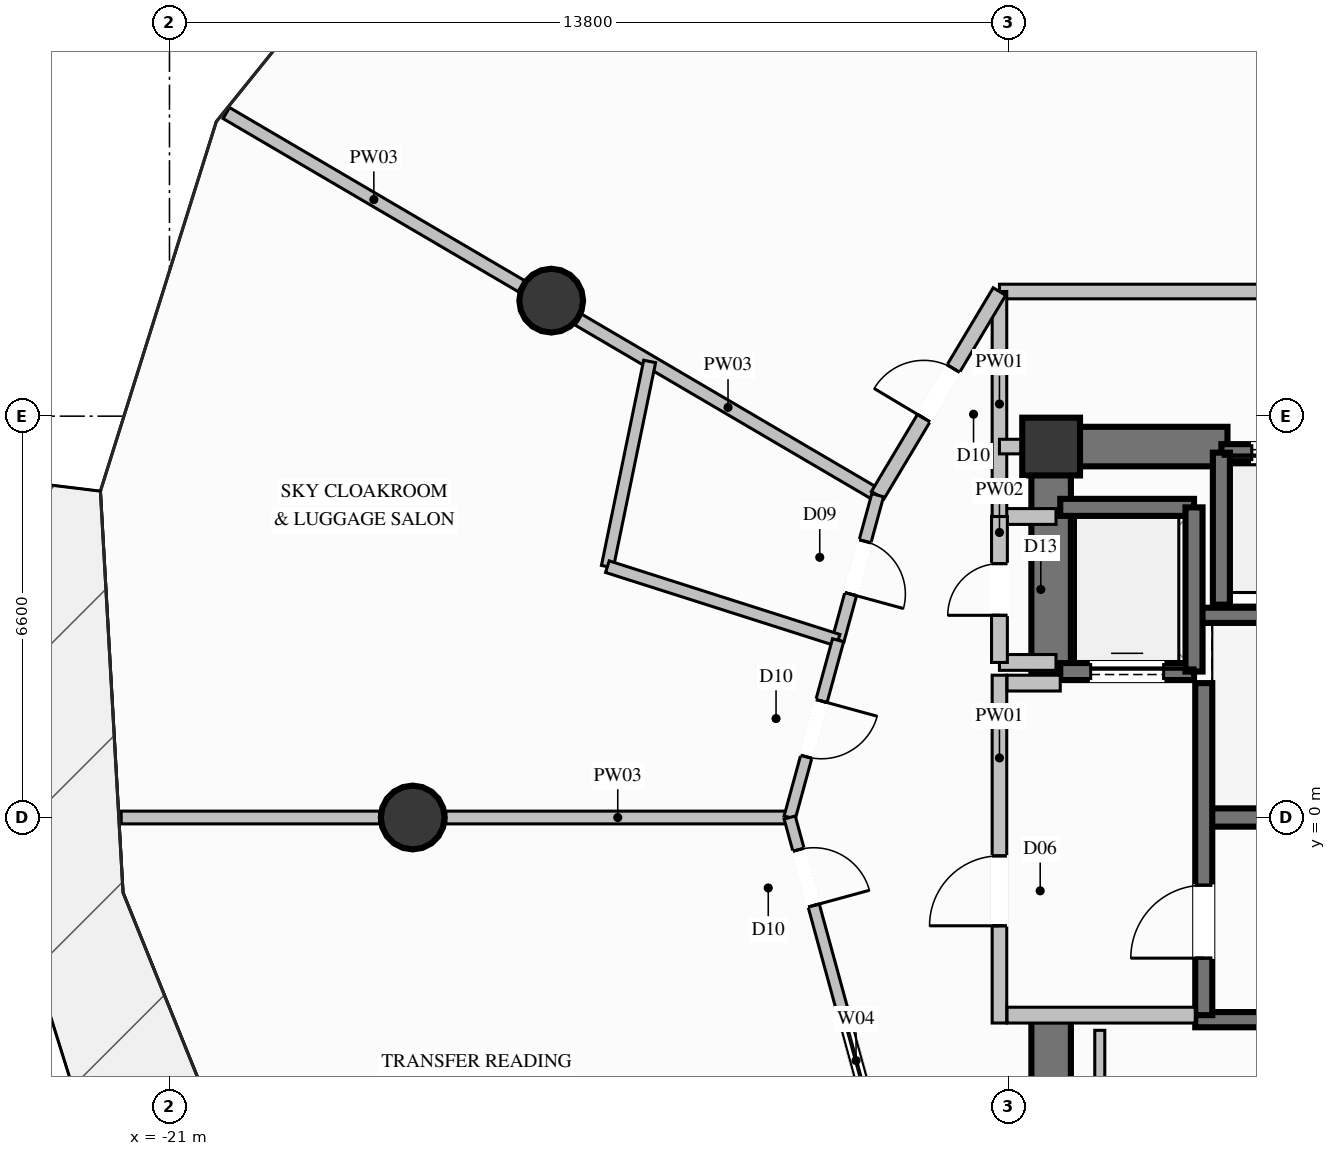
"""IFC4 building model, lengths in metres.
Left out: names, types, materials, properties, quantities, classifications, styles, units other than length and angle.
Written with IfcOpenShell. Run it as: python <this file> out.ifc"""

import sys

from ifc_helpers import new_model, si_unit, direction, frame, frame_2d, origin, origin_2d, place, context, subcontext, project, spatial, rectangle, circle, extrude, element, fill, save


model = new_model("IFC4")
c1 = context("Model", 3, precision=1e-05, world=origin(), true_north=direction((0.0, 1.0)))
c2 = subcontext(c1, "Body", "Model", "MODEL_VIEW")
j1 = project(units=[si_unit("LENGTHUNIT", "METRE"), si_unit("PLANEANGLEUNIT", "RADIAN")], contexts=[c1])
p1 = place(None, origin())
s1 = spatial("IfcSite", under=j1, at=p1, CompositionType="ELEMENT")
p2 = place(p1, origin())
s2 = spatial("IfcBuilding", under=s1, at=p2, CompositionType="ELEMENT")
p3 = place(p2, frame((0.0, 0.0, 98.0)))
s3 = spatial("IfcBuildingStorey", under=s2, at=p3, CompositionType="ELEMENT", Elevation=98.0)
p4 = place(p3, frame((-6.5, 6.1, 0.0), z_axis=(0.0, 0.0, 1.0), x_axis=(1.0, 0.0, 0.0)))
e1 = element("IfcColumn", 1, at=p4, inside=s3, PredefinedType="COLUMN", context=c2, shape_type="SweptSolid", body=[
    extrude(rectangle(XDim=0.95, YDim=0.95, at=origin_2d()), origin(), (0.0, 0.0, 1.0), 4.6),
])
p5 = place(p3, frame((-3.99, 0.0, 0.0), z_axis=(0.0, 0.0, 1.0), x_axis=(1.0, 0.0, 0.0)))
e2 = element("IfcWall", 2, at=p5, inside=s3, PredefinedType="SHEAR", context=c2, shape_type="SweptSolid", body=[
    extrude(rectangle(XDim=7.98, YDim=0.3, at=frame_2d((3.99, 0.0))), origin(), (0.0, 0.0, 1.0), 4.6),
])
for number, where, z_axis, x_axis in (
    (3, (-4.13, -3.325, 0.0), (0.0, 0.0, 1.0), (1.0, 0.0, 0.0)),
    (4, (-4.13, 3.325, 0.0), (0.0, 0.0, 1.0), (1.0, 0.0, 0.0)),
):
    element("IfcWall", number, at=place(p3, frame(where, z_axis=z_axis, x_axis=x_axis)), inside=s3, PredefinedType="SOLIDWALL", context=c2, shape_type="SweptSolid", body=[
        extrude(rectangle(XDim=8.26, YDim=0.25, at=frame_2d((4.13, 0.0))), origin(), (0.0, 0.0, 1.0), 4.6),
    ])
p6 = place(p3, frame((-6.175, 6.1, 0.0), z_axis=(0.0, 0.0, 1.0), x_axis=(1.0, 0.0, 0.0)))
e5 = element("IfcWall", 5, at=p6, inside=s3, PredefinedType="SHEAR", context=c2, shape_type="SweptSolid", body=[
    extrude(rectangle(XDim=2.575, YDim=0.65, at=frame_2d((1.288, 0.0))), origin(), (0.0, 0.0, 1.0), 4.6),
])
p7 = place(p3, frame((-6.5, 2.35, 0.0), z_axis=(0.0, 0.0, 1.0), x_axis=(0.0, 1.0, 0.0)))
e6 = element("IfcWall", 6, at=p7, inside=s3, PredefinedType="SHEAR", context=c2, shape_type="SweptSolid", body=[
    extrude(rectangle(XDim=4.075, YDim=0.65, at=frame_2d((2.038, 0.0))), origin(), (0.0, 0.0, 1.0), 4.6),
])
p8 = place(p3, frame((-6.5, -6.425, 0.0), z_axis=(0.0, 0.0, 1.0), x_axis=(0.0, 1.0, 0.0)))
e7 = element("IfcWall", 7, at=p8, inside=s3, PredefinedType="SHEAR", context=c2, shape_type="SweptSolid", body=[
    extrude(rectangle(XDim=3.075, YDim=0.65, at=frame_2d((1.538, 0.0))), origin(), (0.0, 0.0, 1.0), 4.6),
])
for number, where, z_axis, x_axis in (
    (8, (-14.722, 8.5, 0.0), (0.0, 0.0, 1.0), (1.0, 0.0, 0.0)),
    (9, (-17.0, 0.0, 0.0), (0.0, 0.0, 1.0), (1.0, 0.0, 0.0)),
):
    element("IfcColumn", number, at=place(p3, frame(where, z_axis=z_axis, x_axis=x_axis)), inside=s3, PredefinedType="COLUMN", context=c2, shape_type="SweptSolid", body=[
        extrude(circle(Radius=0.525, at=origin_2d()), origin(), (0.0, 0.0, 1.0), 4.6),
    ])
p9 = place(p3, frame((-1.6, 6.0, 0.0), z_axis=(0.0, 0.0, 1.0), x_axis=(-1.0, 0.0, 0.0)))
e10 = element("IfcWall", 10, at=p9, inside=s3, PredefinedType="SOLIDWALL", context=c2, shape_type="SweptSolid", body=[
    extrude(rectangle(XDim=2.1, YDim=0.28, at=frame_2d((1.05, 0.0))), origin(), (0.0, 0.0, 1.0), 4.35),
])
p10 = place(p9, frame((0.5, 0.0, 0.0)))
e11 = element("IfcOpeningElement", 11, at=p10, cuts=e10, PredefinedType="OPENING", context=c2, shape_type="SweptSolid", body=[
    extrude(rectangle(XDim=1.1, YDim=2.2, at=frame_2d((0.55, 1.1))), frame((0.0, 0.15, 0.0), z_axis=(0.0, -1.0, 0.0), x_axis=(1.0, 0.0, 0.0)), (0.0, 0.0, 1.0), 0.3),
])
p11 = place(p3, frame((-3.7, 6.0, 0.0), z_axis=(0.0, 0.0, 1.0), x_axis=(0.0, -1.0, 0.0)))
e12 = element("IfcWall", 12, at=p11, inside=s3, PredefinedType="SOLIDWALL", context=c2, shape_type="SweptSolid", body=[
    extrude(rectangle(XDim=2.5, YDim=0.28, at=frame_2d((1.25, 0.0))), origin(), (0.0, 0.0, 1.0), 4.35),
])
p12 = place(p3, frame((-6.35, 2.4, 0.0), z_axis=(0.0, 0.0, 1.0), x_axis=(1.0, 0.0, 0.0)))
e13 = element("IfcWall", 13, at=p12, inside=s3, PredefinedType="SOLIDWALL", context=c2, shape_type="SweptSolid", body=[
    extrude(rectangle(XDim=2.2, YDim=0.28, at=frame_2d((1.1, 0.0))), origin(), (0.0, 0.0, 1.0), 4.35),
])
p13 = place(p12, frame((0.5, 0.0, 0.0)))
e14 = element("IfcOpeningElement", 14, at=p13, cuts=e13, PredefinedType="OPENING", context=c2, shape_type="SweptSolid", body=[
    extrude(rectangle(XDim=1.2, YDim=2.2, at=frame_2d((0.6, 1.1))), frame((0.0, 0.15, 0.0), z_axis=(0.0, -1.0, 0.0), x_axis=(1.0, 0.0, 0.0)), (0.0, 0.0, 1.0), 0.3),
])
p14 = place(p3, frame((-4.15, 5.1, 0.0), z_axis=(0.0, 0.0, 1.0), x_axis=(-1.0, 0.0, 0.0)))
e15 = element("IfcWall", 15, at=p14, inside=s3, PredefinedType="SOLIDWALL", context=c2, shape_type="SweptSolid", body=[
    extrude(rectangle(XDim=2.2, YDim=0.28, at=frame_2d((1.1, 0.0))), origin(), (0.0, 0.0, 1.0), 4.35),
])
p15 = place(p3, frame((-4.15, 2.4, 0.0), z_axis=(0.0, 0.0, 1.0), x_axis=(0.0, 1.0, 0.0)))
e16 = element("IfcWall", 16, at=p15, inside=s3, PredefinedType="SOLIDWALL", context=c2, shape_type="SweptSolid", body=[
    extrude(rectangle(XDim=2.7, YDim=0.28, at=frame_2d((1.35, 0.0))), origin(), (0.0, 0.0, 1.0), 4.35),
])
p16 = place(p3, frame((-3.99, -3.25, 0.0), z_axis=(0.0, 0.0, 1.0), x_axis=(0.0, 1.0, 0.0)))
e17 = element("IfcWall", 17, at=p16, inside=s3, PredefinedType="SOLIDWALL", context=c2, shape_type="SweptSolid", body=[
    extrude(rectangle(XDim=5.46, YDim=0.28, at=frame_2d((2.73, 0.0))), origin(), (0.0, 0.0, 1.0), 4.35),
])
p17 = place(p16, frame((0.937, 0.0, 0.0)))
e18 = element("IfcOpeningElement", 18, at=p17, cuts=e17, PredefinedType="OPENING", context=c2, shape_type="SweptSolid", body=[
    extrude(rectangle(XDim=1.2, YDim=2.2, at=frame_2d((0.6, 1.1))), frame((0.0, 0.15, 0.0), z_axis=(0.0, -1.0, 0.0), x_axis=(1.0, 0.0, 0.0)), (0.0, 0.0, 1.0), 0.3),
])
p18 = place(p3, frame((-7.35, -3.38, 0.0), z_axis=(0.0, 0.0, 1.0), x_axis=(0.0, 1.0, 0.0)))
e19 = element("IfcWall", 19, at=p18, inside=s3, PredefinedType="PARTITIONING", context=c2, shape_type="SweptSolid", body=[
    extrude(rectangle(XDim=5.72, YDim=0.24, at=frame_2d((2.86, 0.0))), origin(), (0.0, 0.0, 1.0), 3.235),
])
p19 = place(p18, frame((1.599, 0.0, 0.0)))
e20 = element("IfcOpeningElement", 20, at=p19, cuts=e19, PredefinedType="OPENING", context=c2, shape_type="SweptSolid", body=[
    extrude(rectangle(XDim=1.15, YDim=2.2, at=frame_2d((0.575, 1.1))), frame((0.0, 0.13, 0.0), z_axis=(0.0, -1.0, 0.0), x_axis=(1.0, 0.0, 0.0)), (0.0, 0.0, 1.0), 0.26),
])
p20 = place(p3, frame((-7.225, -3.25, 0.0), z_axis=(0.0, 0.0, 1.0), x_axis=(1.0, 0.0, 0.0)))
e21 = element("IfcWall", 21, at=p20, inside=s3, PredefinedType="PARTITIONING", context=c2, shape_type="SweptSolid", body=[
    extrude(rectangle(XDim=3.095, YDim=0.26, at=frame_2d((1.548, 0.0))), origin(), (0.0, 0.0, 1.0), 4.35),
])
p21 = place(p3, frame((-7.225, 2.21, 0.0), z_axis=(0.0, 0.0, 1.0), x_axis=(1.0, 0.0, 0.0)))
e22 = element("IfcWall", 22, at=p21, inside=s3, PredefinedType="PARTITIONING", context=c2, shape_type="SweptSolid", body=[
    extrude(rectangle(XDim=0.875, YDim=0.26, at=frame_2d((0.438, 0.0))), origin(), (0.0, 0.0, 1.0), 4.35),
])
for number, where, z_axis, x_axis in (
    (23, (-7.35, 4.95, 0.0), (0.0, 0.0, 1.0), (1.0, 0.0, 0.0)),
    (24, (-7.35, 2.55, 0.0), (0.0, 0.0, 1.0), (1.0, 0.0, 0.0)),
):
    element("IfcWall", number, at=place(p3, frame(where, z_axis=z_axis, x_axis=x_axis)), inside=s3, PredefinedType="PARTITIONING", context=c2, shape_type="SweptSolid", body=[
        extrude(rectangle(XDim=0.93, YDim=0.26, at=frame_2d((0.465, 0.0))), origin(), (0.0, 0.0, 1.0), 4.35),
    ])
p22 = place(p3, frame((-7.35, 2.55, 0.0), z_axis=(0.0, 0.0, 1.0), x_axis=(0.0, 1.0, 0.0)))
e25 = element("IfcWall", 25, at=p22, inside=s3, PredefinedType="PARTITIONING", context=c2, shape_type="SweptSolid", body=[
    extrude(rectangle(XDim=2.4, YDim=0.26, at=frame_2d((1.2, 0.0))), origin(), (0.0, 0.0, 1.0), 3.235),
])
p23 = place(p22, frame((0.775, 0.0, 0.0)))
e26 = element("IfcOpeningElement", 26, at=p23, cuts=e25, PredefinedType="OPENING", context=c2, shape_type="SweptSolid", body=[
    extrude(rectangle(XDim=0.85, YDim=2.05, at=frame_2d((0.425, 1.025))), frame((0.0, 0.14, 0.0), z_axis=(0.0, -1.0, 0.0), x_axis=(1.0, 0.0, 0.0)), (0.0, 0.0, 1.0), 0.28),
])
p24 = place(p3, frame((-7.35, 8.65, 0.0), z_axis=(0.0, 0.0, 1.0), x_axis=(1.0, 0.0, 0.0)))
e27 = element("IfcWall", 27, at=p24, inside=s3, PredefinedType="PARTITIONING", context=c2, shape_type="SweptSolid", body=[
    extrude(rectangle(XDim=14.7, YDim=0.24, at=frame_2d((7.35, 0.0))), origin(), (0.0, 0.0, 1.0), 4.35),
])
p25 = place(p3, frame((-7.35, 4.95, 0.0), z_axis=(0.0, 0.0, 1.0), x_axis=(0.0, 1.0, 0.0)))
e28 = element("IfcWall", 28, at=p25, inside=s3, PredefinedType="PARTITIONING", context=c2, shape_type="SweptSolid", body=[
    extrude(rectangle(XDim=3.7, YDim=0.24, at=frame_2d((1.85, 0.0))), origin(), (0.0, 0.0, 1.0), 3.235),
])
p26 = place(p3, frame((-7.35, 6.1, 0.0), z_axis=(0.0, 0.0, 1.0), x_axis=(1.0, 0.0, 0.0)))
e29 = element("IfcWall", 29, at=p26, inside=s3, PredefinedType="PARTITIONING", context=c2, shape_type="SweptSolid", body=[
    extrude(rectangle(XDim=0.85, YDim=0.24, at=frame_2d((0.425, 0.0))), origin(), (0.0, 0.0, 1.0), 3.718),
])
p27 = place(p3, frame((-5.7, -3.5, 0.0), z_axis=(0.0, 0.0, 1.0), x_axis=(0.0, -1.0, 0.0)))
e30 = element("IfcWall", 30, at=p27, inside=s3, PredefinedType="PARTITIONING", context=c2, shape_type="SweptSolid", body=[
    extrude(rectangle(XDim=3.35, YDim=0.165, at=frame_2d((1.675, 0.0))), origin(), (0.0, 0.0, 1.0), 3.235),
])
p28 = place(p3, frame((-9.353, 5.3, 0.0), z_axis=(0.0, 0.0, 1.0), x_axis=(-0.86249129364, 0.50607190042, 0.0)))
e31 = element("IfcWall", 31, at=p28, inside=s3, PredefinedType="PARTITIONING", context=c2, shape_type="SweptSolid", body=[
    extrude(rectangle(XDim=5.707, YDim=0.21, at=frame_2d((2.853, 0.0))), origin(), (0.0, 0.0, 1.0), 3.718),
])
p29 = place(p3, frame((-15.212, 8.738, 0.0), z_axis=(0.0, 0.0, 1.0), x_axis=(-0.862583726105, 0.505914336088, 0.0)))
e32 = element("IfcWall", 32, at=p29, inside=s3, PredefinedType="PARTITIONING", context=c2, shape_type="SweptSolid", body=[
    extrude(rectangle(XDim=5.627, YDim=0.21, at=frame_2d((2.813, 0.0))), origin(), (0.0, 0.0, 1.0), 4.35),
])
p30 = place(p3, frame((-10.8, 0.0, 0.0), z_axis=(0.0, 0.0, 1.0), x_axis=(-1.0, 0.0, 0.0)))
e33 = element("IfcWall", 33, at=p30, inside=s3, PredefinedType="PARTITIONING", context=c2, shape_type="SweptSolid", body=[
    extrude(rectangle(XDim=5.655, YDim=0.21, at=frame_2d((2.828, 0.0))), origin(), (0.0, 0.0, 1.0), 4.35),
])
p31 = place(p3, frame((-17.545, 0.0, 0.0), z_axis=(0.0, 0.0, 1.0), x_axis=(-1.0, 0.0, 0.0)))
e34 = element("IfcWall", 34, at=p31, inside=s3, PredefinedType="PARTITIONING", context=c2, shape_type="SweptSolid", body=[
    extrude(rectangle(XDim=4.249, YDim=0.21, at=frame_2d((2.125, 0.0))), origin(), (0.0, 0.0, 1.0), 4.35),
])
p32 = place(p3, frame((-9.353, 5.3, 0.0), z_axis=(0.0, 0.0, 1.0), x_axis=(0.513179710324, 0.858281180565, 0.0)))
e35 = element("IfcWall", 35, at=p32, inside=s3, PredefinedType="PARTITIONING", context=c2, shape_type="SweptSolid", body=[
    extrude(rectangle(XDim=3.903, YDim=0.24, at=frame_2d((1.952, 0.0))), origin(), (0.0, 0.0, 1.0), 4.35),
])
p33 = place(p32, frame((1.477, 0.0, 0.0)))
e36 = element("IfcOpeningElement", 36, at=p33, cuts=e35, PredefinedType="OPENING", context=c2, shape_type="SweptSolid", body=[
    extrude(rectangle(XDim=0.95, YDim=2.1, at=frame_2d((0.475, 1.05))), frame((0.0, 0.13, 0.0), z_axis=(0.0, -1.0, 0.0), x_axis=(1.0, 0.0, 0.0)), (0.0, 0.0, 1.0), 0.26),
])
p34 = place(p3, frame((-9.353, 5.3, 0.0), z_axis=(0.0, 0.0, 1.0), x_axis=(-0.263276167071, -0.964720508672, 0.0)))
e37 = element("IfcWall", 37, at=p34, inside=s3, PredefinedType="PLUMBINGWALL", context=c2, shape_type="SweptSolid", body=[
    extrude(rectangle(XDim=2.472, YDim=0.2, at=frame_2d((1.236, 0.0))), origin(), (0.0, 0.0, 1.0), 4.35),
])
p35 = place(p34, frame((0.786, 0.0, 0.0)))
e38 = element("IfcOpeningElement", 38, at=p35, cuts=e37, PredefinedType="OPENING", context=c2, shape_type="SweptSolid", body=[
    extrude(rectangle(XDim=0.9, YDim=2.1, at=frame_2d((0.45, 1.05))), frame((0.0, 0.11, 0.0), z_axis=(0.0, -1.0, 0.0), x_axis=(1.0, 0.0, 0.0)), (0.0, 0.0, 1.0), 0.22),
])
p36 = place(p3, frame((-13.103, 7.5, 0.0), z_axis=(0.0, 0.0, 1.0), x_axis=(-0.201712893782, -0.979444693937, 0.0)))
e39 = element("IfcWall", 39, at=p36, inside=s3, PredefinedType="PLUMBINGWALL", context=c2, shape_type="SweptSolid", body=[
    extrude(rectangle(XDim=3.446, YDim=0.2, at=frame_2d((1.723, 0.0))), origin(), (0.0, 0.0, 1.0), 4.35),
])
p37 = place(p3, frame((-10.004, 2.915, 0.0), z_axis=(0.0, 0.0, 1.0), x_axis=(-0.952728323805, 0.303823535987, 0.0)))
e40 = element("IfcWall", 40, at=p37, inside=s3, PredefinedType="PLUMBINGWALL", context=c2, shape_type="SweptSolid", body=[
    extrude(rectangle(XDim=3.982, YDim=0.2, at=frame_2d((1.991, 0.0))), origin(), (0.0, 0.0, 1.0), 4.35),
])
p38 = place(p3, frame((-10.004, 2.915, 0.0), z_axis=(0.0, 0.0, 1.0), x_axis=(-0.26346604157, -0.964668671068, 0.0)))
e41 = element("IfcWall", 41, at=p38, inside=s3, PredefinedType="PARTITIONING", context=c2, shape_type="SweptSolid", body=[
    extrude(rectangle(XDim=3.022, YDim=0.19, at=frame_2d((1.511, 0.0))), origin(), (0.0, 0.0, 1.0), 4.35),
])
p39 = place(p38, frame((1.036, 0.0, 0.0)))
e42 = element("IfcOpeningElement", 42, at=p39, cuts=e41, PredefinedType="OPENING", context=c2, shape_type="SweptSolid", body=[
    extrude(rectangle(XDim=0.95, YDim=2.1, at=frame_2d((0.475, 1.05))), frame((0.0, 0.105, 0.0), z_axis=(0.0, -1.0, 0.0), x_axis=(1.0, 0.0, 0.0)), (0.0, 0.0, 1.0), 0.21),
])
p40 = place(p3, frame((-10.8, 0.0, 0.0), z_axis=(0.0, 0.0, 1.0), x_axis=(0.263380602271, -0.964692001805, 0.0)))
e43 = element("IfcWall", 43, at=p40, inside=s3, PredefinedType="PARTITIONING", context=c2, shape_type="SweptSolid", body=[
    extrude(rectangle(XDim=5.494, YDim=0.19, at=frame_2d((2.747, 0.0))), origin(), (0.0, 0.0, 1.0), 4.35),
])
p41 = place(p40, frame((0.55, 0.0, 0.0)))
e44 = element("IfcOpeningElement", 44, at=p41, cuts=e43, PredefinedType="OPENING", context=c2, shape_type="SweptSolid", body=[
    extrude(rectangle(XDim=0.95, YDim=2.1, at=frame_2d((0.475, 1.05))), frame((0.0, 0.105, 0.0), z_axis=(0.0, -1.0, 0.0), x_axis=(1.0, 0.0, 0.0)), (0.0, 0.0, 1.0), 0.21),
])
p42 = place(p40, frame((3.344, 0.0, 0.9)))
e45 = element("IfcOpeningElement", 45, at=p42, cuts=e43, PredefinedType="OPENING", context=c2, shape_type="SweptSolid", body=[
    extrude(rectangle(XDim=1.6, YDim=1.4, at=frame_2d((0.8, 0.7))), frame((0.0, 0.105, 0.0), z_axis=(0.0, -1.0, 0.0), x_axis=(1.0, 0.0, 0.0)), (0.0, 0.0, 1.0), 0.21),
])
p43 = place(p10, origin())
e46 = element("IfcDoor", 46, at=p43, inside=s3, OperationType="SLIDING_TO_LEFT", PredefinedType="DOOR", context=c2, shape_type="SweptSolid", body=[
    extrude(rectangle(XDim=1.1, YDim=2.2, at=frame_2d((0.55, 1.1))), frame((0.0, 0.025, 0.0), z_axis=(0.0, -1.0, 0.0), x_axis=(1.0, 0.0, 0.0)), (0.0, 0.0, 1.0), 0.05),
])
fill(e11, e46)
p44 = place(p13, origin())
e47 = element("IfcDoor", 47, at=p44, inside=s3, OperationType="SLIDING_TO_LEFT", PredefinedType="DOOR", context=c2, shape_type="SweptSolid", body=[
    extrude(rectangle(XDim=1.2, YDim=2.2, at=frame_2d((0.6, 1.1))), frame((0.0, 0.025, 0.0), z_axis=(0.0, -1.0, 0.0), x_axis=(1.0, 0.0, 0.0)), (0.0, 0.0, 1.0), 0.05),
])
fill(e14, e47)
p45 = place(p17, origin())
e48 = element("IfcDoor", 48, at=p45, inside=s3, OperationType="SINGLE_SWING_LEFT", PredefinedType="DOOR", context=c2, shape_type="SweptSolid", body=[
    extrude(rectangle(XDim=1.2, YDim=2.2, at=frame_2d((0.6, 1.1))), frame((0.0, 0.025, 0.0), z_axis=(0.0, -1.0, 0.0), x_axis=(1.0, 0.0, 0.0)), (0.0, 0.0, 1.0), 0.05),
])
fill(e18, e48)
p46 = place(p19, origin())
e49 = element("IfcDoor", 49, at=p46, inside=s3, OperationType="SINGLE_SWING_LEFT", PredefinedType="DOOR", context=c2, shape_type="SweptSolid", body=[
    extrude(rectangle(XDim=1.15, YDim=2.2, at=frame_2d((0.575, 1.1))), frame((0.0, 0.025, 0.0), z_axis=(0.0, -1.0, 0.0), x_axis=(1.0, 0.0, 0.0)), (0.0, 0.0, 1.0), 0.05),
])
fill(e20, e49)
p47 = place(p23, origin())
e50 = element("IfcDoor", 50, at=p47, inside=s3, OperationType="SINGLE_SWING_LEFT", PredefinedType="DOOR", context=c2, shape_type="SweptSolid", body=[
    extrude(rectangle(XDim=0.85, YDim=2.05, at=frame_2d((0.425, 1.025))), frame((0.0, 0.025, 0.0), z_axis=(0.0, -1.0, 0.0), x_axis=(1.0, 0.0, 0.0)), (0.0, 0.0, 1.0), 0.05),
])
fill(e26, e50)
p48 = place(p33, origin())
e51 = element("IfcDoor", 51, at=p48, inside=s3, OperationType="SINGLE_SWING_LEFT", PredefinedType="DOOR", context=c2, shape_type="SweptSolid", body=[
    extrude(rectangle(XDim=0.95, YDim=2.1, at=frame_2d((0.475, 1.05))), frame((0.0, 0.025, 0.0), z_axis=(0.0, -1.0, 0.0), x_axis=(1.0, 0.0, 0.0)), (0.0, 0.0, 1.0), 0.05),
])
fill(e36, e51)
p49 = place(p35, origin())
e52 = element("IfcDoor", 52, at=p49, inside=s3, OperationType="SINGLE_SWING_RIGHT", PredefinedType="DOOR", context=c2, shape_type="SweptSolid", body=[
    extrude(rectangle(XDim=0.9, YDim=2.1, at=frame_2d((0.45, 1.05))), frame((0.0, 0.025, 0.0), z_axis=(0.0, -1.0, 0.0), x_axis=(1.0, 0.0, 0.0)), (0.0, 0.0, 1.0), 0.05),
])
fill(e38, e52)
p50 = place(p39, origin())
e53 = element("IfcDoor", 53, at=p50, inside=s3, OperationType="SINGLE_SWING_LEFT", PredefinedType="DOOR", context=c2, shape_type="SweptSolid", body=[
    extrude(rectangle(XDim=0.95, YDim=2.1, at=frame_2d((0.475, 1.05))), frame((0.0, 0.025, 0.0), z_axis=(0.0, -1.0, 0.0), x_axis=(1.0, 0.0, 0.0)), (0.0, 0.0, 1.0), 0.05),
])
fill(e42, e53)
p51 = place(p41, origin())
e54 = element("IfcDoor", 54, at=p51, inside=s3, OperationType="SINGLE_SWING_RIGHT", PredefinedType="DOOR", context=c2, shape_type="SweptSolid", body=[
    extrude(rectangle(XDim=0.95, YDim=2.1, at=frame_2d((0.475, 1.05))), frame((0.0, 0.025, 0.0), z_axis=(0.0, -1.0, 0.0), x_axis=(1.0, 0.0, 0.0)), (0.0, 0.0, 1.0), 0.05),
])
fill(e44, e54)
p52 = place(p42, origin())
e55 = element("IfcWindow", 55, at=p52, inside=s3, PartitioningType="SINGLE_PANEL", PredefinedType="WINDOW", context=c2, shape_type="SweptSolid", body=[
    extrude(rectangle(XDim=1.6, YDim=1.4, at=frame_2d((0.8, 0.7))), frame((0.0, 0.03, 0.0), z_axis=(0.0, -1.0, 0.0), x_axis=(1.0, 0.0, 0.0)), (0.0, 0.0, 1.0), 0.06),
])
fill(e45, e55)
save(model, sys.argv[1])
